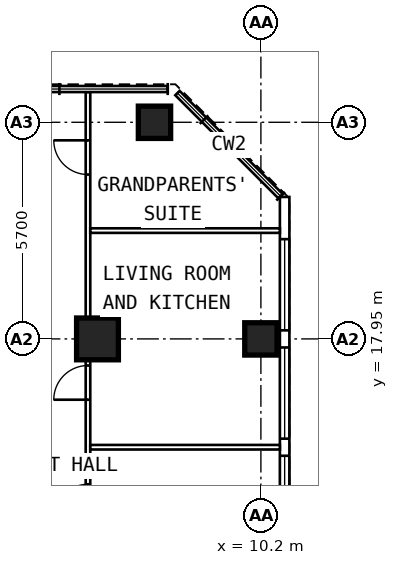
"""IFC4 building model, lengths in metres.
Left out: names, types, materials, properties, quantities, classifications, styles, units other than length and angle.
Written with IfcOpenShell. Run it as: python <this file> out.ifc"""

import sys

from ifc_helpers import new_model, si_unit, direction, frame, frame_2d, origin, origin_2d, place, context, subcontext, project, spatial, rectangle, extrude, element, fill, save


model = new_model("IFC4")
c1 = context("Model", 3, precision=1e-05, world=origin(), true_north=direction((0.0, 1.0)))
c2 = subcontext(c1, "Body", "Model", "MODEL_VIEW")
j1 = project(units=[si_unit("LENGTHUNIT", "METRE"), si_unit("PLANEANGLEUNIT", "RADIAN")], contexts=[c1])
p1 = place(None, origin())
s1 = spatial("IfcSite", under=j1, at=p1, CompositionType="ELEMENT")
p2 = place(p1, origin())
s2 = spatial("IfcBuilding", under=s1, at=p2, CompositionType="ELEMENT")
p3 = place(p2, frame((0.0, 0.0, 231.6)))
s3 = spatial("IfcBuildingStorey", under=s2, at=p3, CompositionType="ELEMENT", Elevation=231.6)
for number, where, z_axis, x_axis in (
    (1, (10.2, 17.95, 0.0), (0.0, 0.0, 1.0), (0.0, 1.0, 0.0)),
    (2, (7.4, 23.65, 0.0), (0.0, 0.0, 1.0), (0.0, 1.0, 0.0)),
):
    element("IfcColumn", number, at=place(p3, frame(where, z_axis=z_axis, x_axis=x_axis)), inside=s3, PredefinedType="COLUMN", context=c2, shape_type="SweptSolid", body=[
        extrude(rectangle(XDim=0.85, YDim=0.85, at=origin_2d()), origin(), (0.0, 0.0, 1.0), 3.6),
    ])
p4 = place(p3, frame((5.9, 17.95, 0.0), z_axis=(0.0, 0.0, 1.0), x_axis=(0.0, 1.0, 0.0)))
e3 = element("IfcColumn", 3, at=p4, inside=s3, PredefinedType="COLUMN", context=c2, shape_type="SweptSolid", body=[
    extrude(rectangle(XDim=1.1, YDim=1.1, at=origin_2d()), origin(), (0.0, 0.0, 1.0), 3.6),
])
p5 = place(p3, frame((10.825, 6.409, 0.0), z_axis=(0.0, 0.0, 1.0), x_axis=(0.0, 1.0, 0.0)))
e4 = element("IfcWall", 4, at=p5, inside=s3, PredefinedType="SOLIDWALL", context=c2, shape_type="SweptSolid", body=[
    extrude(rectangle(XDim=15.276, YDim=0.25, at=frame_2d((7.638, 0.0))), origin(), (0.0, 0.0, 1.0), 3.35),
])
p6 = place(p5, frame((0.366, 0.0, 0.8)))
e5 = element("IfcOpeningElement", 5, at=p6, cuts=e4, PredefinedType="OPENING", context=c2, shape_type="SweptSolid", body=[
    extrude(rectangle(XDim=2.4, YDim=1.8, at=frame_2d((1.2, 0.9))), frame((0.0, 0.137, 0.0), z_axis=(0.0, -1.0, 0.0), x_axis=(1.0, 0.0, 0.0)), (0.0, 0.0, 1.0), 0.274),
])
p7 = place(p5, frame((3.216, 0.0, 0.8)))
e6 = element("IfcOpeningElement", 6, at=p7, cuts=e4, PredefinedType="OPENING", context=c2, shape_type="SweptSolid", body=[
    extrude(rectangle(XDim=2.4, YDim=1.8, at=frame_2d((1.2, 0.9))), frame((0.0, 0.137, 0.0), z_axis=(0.0, -1.0, 0.0), x_axis=(1.0, 0.0, 0.0)), (0.0, 0.0, 1.0), 0.274),
])
p8 = place(p5, frame((6.066, 0.0, 0.8)))
e7 = element("IfcOpeningElement", 7, at=p8, cuts=e4, PredefinedType="OPENING", context=c2, shape_type="SweptSolid", body=[
    extrude(rectangle(XDim=2.4, YDim=1.8, at=frame_2d((1.2, 0.9))), frame((0.0, 0.137, 0.0), z_axis=(0.0, -1.0, 0.0), x_axis=(1.0, 0.0, 0.0)), (0.0, 0.0, 1.0), 0.274),
])
p9 = place(p5, frame((8.916, 0.0, 0.8)))
e8 = element("IfcOpeningElement", 8, at=p9, cuts=e4, PredefinedType="OPENING", context=c2, shape_type="SweptSolid", body=[
    extrude(rectangle(XDim=2.4, YDim=1.8, at=frame_2d((1.2, 0.9))), frame((0.0, 0.137, 0.0), z_axis=(0.0, -1.0, 0.0), x_axis=(1.0, 0.0, 0.0)), (0.0, 0.0, 1.0), 0.274),
])
p10 = place(p5, frame((11.766, 0.0, 0.8)))
e9 = element("IfcOpeningElement", 9, at=p10, cuts=e4, PredefinedType="OPENING", context=c2, shape_type="SweptSolid", body=[
    extrude(rectangle(XDim=2.4, YDim=1.8, at=frame_2d((1.2, 0.9))), frame((0.0, 0.137, 0.0), z_axis=(0.0, -1.0, 0.0), x_axis=(1.0, 0.0, 0.0)), (0.0, 0.0, 1.0), 0.274),
])
p11 = place(p3, frame((5.65, 9.6, 0.0), z_axis=(0.0, 0.0, 1.0), x_axis=(0.0, 1.0, 0.0)))
e10 = element("IfcWall", 10, at=p11, inside=s3, PredefinedType="PARTITIONING", context=c2, shape_type="SweptSolid", body=[
    extrude(rectangle(XDim=14.845, YDim=0.12, at=frame_2d((7.422, 0.0))), origin(), (0.0, 0.0, 1.0), 3.35),
])
p12 = place(p11, frame((1.05, 0.0, 0.0)))
e11 = element("IfcOpeningElement", 11, at=p12, cuts=e10, PredefinedType="OPENING", context=c2, shape_type="SweptSolid", body=[
    extrude(rectangle(XDim=0.9, YDim=2.1, at=frame_2d((0.45, 1.05))), frame((0.0, 0.072, 0.0), z_axis=(0.0, -1.0, 0.0), x_axis=(1.0, 0.0, 0.0)), (0.0, 0.0, 1.0), 0.144),
])
p13 = place(p11, frame((3.625, 0.0, 0.0)))
e12 = element("IfcOpeningElement", 12, at=p13, cuts=e10, PredefinedType="OPENING", context=c2, shape_type="SweptSolid", body=[
    extrude(rectangle(XDim=0.9, YDim=2.1, at=frame_2d((0.45, 1.05))), frame((0.0, 0.072, 0.0), z_axis=(0.0, -1.0, 0.0), x_axis=(1.0, 0.0, 0.0)), (0.0, 0.0, 1.0), 0.144),
])
p14 = place(p11, frame((6.75, 0.0, 0.0)))
e13 = element("IfcOpeningElement", 13, at=p14, cuts=e10, PredefinedType="OPENING", context=c2, shape_type="SweptSolid", body=[
    extrude(rectangle(XDim=0.9, YDim=2.1, at=frame_2d((0.45, 1.05))), frame((0.0, 0.072, 0.0), z_axis=(0.0, -1.0, 0.0), x_axis=(1.0, 0.0, 0.0)), (0.0, 0.0, 1.0), 0.144),
])
p15 = place(p11, frame((12.675, 0.0, 0.0)))
e14 = element("IfcOpeningElement", 14, at=p15, cuts=e10, PredefinedType="OPENING", context=c2, shape_type="SweptSolid", body=[
    extrude(rectangle(XDim=0.9, YDim=2.1, at=frame_2d((0.45, 1.05))), frame((0.0, 0.072, 0.0), z_axis=(0.0, -1.0, 0.0), x_axis=(1.0, 0.0, 0.0)), (0.0, 0.0, 1.0), 0.144),
])
for number, where, z_axis, x_axis in (
    (15, (5.71, 15.1, 0.0), (0.0, 0.0, 1.0), (1.0, 0.0, 0.0)),
    (16, (5.71, 20.8, 0.0), (0.0, 0.0, 1.0), (1.0, 0.0, 0.0)),
):
    element("IfcWall", number, at=place(p3, frame(where, z_axis=z_axis, x_axis=x_axis)), inside=s3, PredefinedType="PARTITIONING", context=c2, shape_type="SweptSolid", body=[
        extrude(rectangle(XDim=4.99, YDim=0.12, at=frame_2d((2.495, 0.0))), origin(), (0.0, 0.0, 1.0), 3.35),
    ])
p16 = place(p8, origin())
e17 = element("IfcWindow", 17, at=p16, inside=s3, PartitioningType="SINGLE_PANEL", PredefinedType="WINDOW", context=c2, shape_type="SweptSolid", body=[
    extrude(rectangle(XDim=2.4, YDim=1.8, at=frame_2d((1.2, 0.9))), frame((0.0, 0.03, 0.0), z_axis=(0.0, -1.0, 0.0), x_axis=(1.0, 0.0, 0.0)), (0.0, 0.0, 1.0), 0.06),
])
fill(e7, e17)
p17 = place(p9, origin())
e18 = element("IfcWindow", 18, at=p17, inside=s3, PartitioningType="SINGLE_PANEL", PredefinedType="WINDOW", context=c2, shape_type="SweptSolid", body=[
    extrude(rectangle(XDim=2.4, YDim=1.8, at=frame_2d((1.2, 0.9))), frame((0.0, 0.03, 0.0), z_axis=(0.0, -1.0, 0.0), x_axis=(1.0, 0.0, 0.0)), (0.0, 0.0, 1.0), 0.06),
])
fill(e8, e18)
p18 = place(p10, origin())
e19 = element("IfcWindow", 19, at=p18, inside=s3, PartitioningType="SINGLE_PANEL", PredefinedType="WINDOW", context=c2, shape_type="SweptSolid", body=[
    extrude(rectangle(XDim=2.4, YDim=1.8, at=frame_2d((1.2, 0.9))), frame((0.0, 0.03, 0.0), z_axis=(0.0, -1.0, 0.0), x_axis=(1.0, 0.0, 0.0)), (0.0, 0.0, 1.0), 0.06),
])
fill(e9, e19)
p19 = place(p13, origin())
e20 = element("IfcDoor", 20, at=p19, inside=s3, OperationType="SINGLE_SWING_LEFT", PredefinedType="DOOR", context=c2, shape_type="SweptSolid", body=[
    extrude(rectangle(XDim=0.9, YDim=2.1, at=frame_2d((0.45, 1.05))), frame((0.0, 0.025, 0.0), z_axis=(0.0, -1.0, 0.0), x_axis=(1.0, 0.0, 0.0)), (0.0, 0.0, 1.0), 0.05),
])
fill(e12, e20)
p20 = place(p14, origin())
e21 = element("IfcDoor", 21, at=p20, inside=s3, OperationType="SINGLE_SWING_LEFT", PredefinedType="DOOR", context=c2, shape_type="SweptSolid", body=[
    extrude(rectangle(XDim=0.9, YDim=2.1, at=frame_2d((0.45, 1.05))), frame((0.0, 0.025, 0.0), z_axis=(0.0, -1.0, 0.0), x_axis=(1.0, 0.0, 0.0)), (0.0, 0.0, 1.0), 0.05),
])
fill(e13, e21)
p21 = place(p15, origin())
e22 = element("IfcDoor", 22, at=p21, inside=s3, OperationType="SINGLE_SWING_RIGHT", PredefinedType="DOOR", context=c2, shape_type="SweptSolid", body=[
    extrude(rectangle(XDim=0.9, YDim=2.1, at=frame_2d((0.45, 1.05))), frame((0.0, 0.025, 0.0), z_axis=(0.0, -1.0, 0.0), x_axis=(1.0, 0.0, 0.0)), (0.0, 0.0, 1.0), 0.05),
])
fill(e14, e22)
save(model, sys.argv[1])
